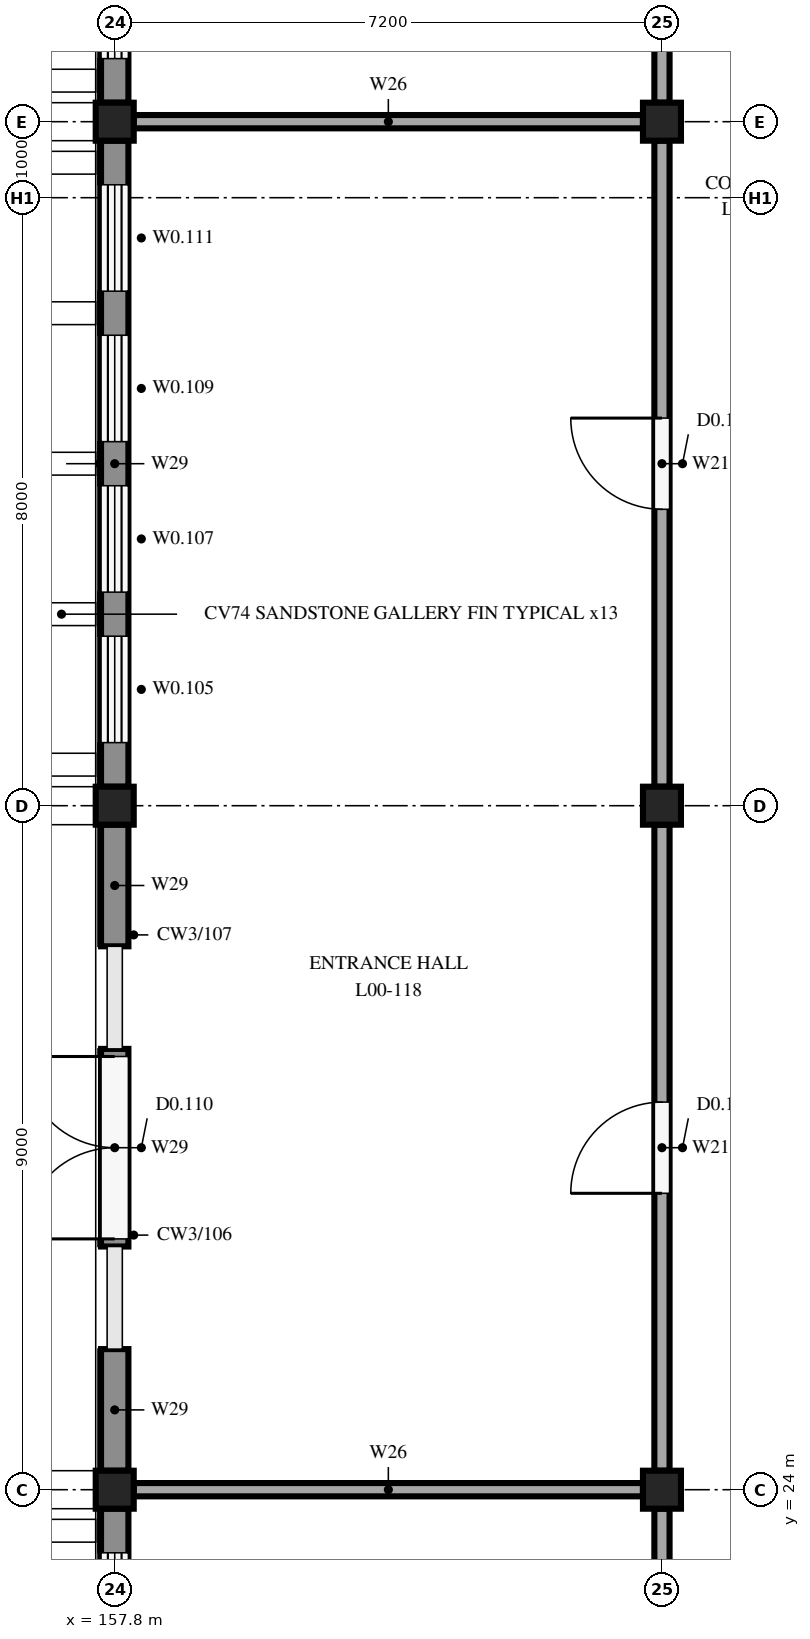
"""IFC4 building model, lengths in metres.
Left out: names, types, materials, properties, quantities, classifications, styles, units other than length and angle.
Written with IfcOpenShell. Run it as: python <this file> out.ifc"""

import sys

from ifc_helpers import new_model, si_unit, direction, frame, frame_2d, origin, origin_2d, place, context, subcontext, project, spatial, rectangle, extrude, element, fill, save


model = new_model("IFC4")
c1 = context("Model", 3, precision=1e-05, world=origin(), true_north=direction((0.0, 1.0)))
c2 = subcontext(c1, "Body", "Model", "MODEL_VIEW")
j1 = project(units=[si_unit("LENGTHUNIT", "METRE"), si_unit("PLANEANGLEUNIT", "RADIAN")], contexts=[c1])
p1 = place(None, origin())
s1 = spatial("IfcSite", under=j1, at=p1, CompositionType="ELEMENT")
p2 = place(p1, origin())
s2 = spatial("IfcBuilding", under=s1, at=p2, CompositionType="ELEMENT")
p3 = place(p2, origin())
s3 = spatial("IfcBuildingStorey", under=s2, at=p3, CompositionType="ELEMENT", Elevation=0.0)
for number, where, z_axis, x_axis in (
    (1, (157.8, 24.0, 0.0), (0.0, 0.0, 1.0), (1.0, 0.0, 0.0)),
    (2, (157.8, 33.0, 0.0), (0.0, 0.0, 1.0), (1.0, 0.0, 0.0)),
    (3, (157.8, 42.0, 0.0), (0.0, 0.0, 1.0), (1.0, 0.0, 0.0)),
    (4, (165.0, 24.0, 0.0), (0.0, 0.0, 1.0), (1.0, 0.0, 0.0)),
    (5, (165.0, 33.0, 0.0), (0.0, 0.0, 1.0), (1.0, 0.0, 0.0)),
    (6, (165.0, 42.0, 0.0), (0.0, 0.0, 1.0), (1.0, 0.0, 0.0)),
):
    element("IfcColumn", number, at=place(p3, frame(where, z_axis=z_axis, x_axis=x_axis)), inside=s3, PredefinedType="COLUMN", context=c2, shape_type="SweptSolid", body=[
        extrude(rectangle(XDim=0.5, YDim=0.5, at=origin_2d()), origin(), (0.0, 0.0, 1.0), 4.25),
    ])
p4 = place(p3, frame((157.8, 15.25, 0.0), z_axis=(0.0, 0.0, 1.0), x_axis=(0.0, 1.0, 0.0)))
e7 = element("IfcWall", 7, at=p4, inside=s3, PredefinedType="STANDARD", context=c2, shape_type="SweptSolid", body=[
    extrude(rectangle(XDim=8.5, YDim=0.36, at=frame_2d((4.25, 0.0))), origin(), (0.0, 0.0, 1.0), 3.75),
])
p5 = place(p4, frame((0.58, 0.0, 0.6)))
e8 = element("IfcOpeningElement", 8, at=p5, cuts=e7, PredefinedType="OPENING", context=c2, shape_type="SweptSolid", body=[
    extrude(rectangle(XDim=1.4, YDim=3.0, at=frame_2d((0.7, 1.5))), frame((0.0, 0.19, 0.0), z_axis=(0.0, -1.0, 0.0), x_axis=(1.0, 0.0, 0.0)), (0.0, 0.0, 1.0), 0.38),
])
p6 = place(p4, frame((2.56, 0.0, 0.6)))
e9 = element("IfcOpeningElement", 9, at=p6, cuts=e7, PredefinedType="OPENING", context=c2, shape_type="SweptSolid", body=[
    extrude(rectangle(XDim=1.4, YDim=3.0, at=frame_2d((0.7, 1.5))), frame((0.0, 0.19, 0.0), z_axis=(0.0, -1.0, 0.0), x_axis=(1.0, 0.0, 0.0)), (0.0, 0.0, 1.0), 0.38),
])
p7 = place(p4, frame((4.54, 0.0, 0.6)))
e10 = element("IfcOpeningElement", 10, at=p7, cuts=e7, PredefinedType="OPENING", context=c2, shape_type="SweptSolid", body=[
    extrude(rectangle(XDim=1.4, YDim=3.0, at=frame_2d((0.7, 1.5))), frame((0.0, 0.19, 0.0), z_axis=(0.0, -1.0, 0.0), x_axis=(1.0, 0.0, 0.0)), (0.0, 0.0, 1.0), 0.38),
])
p8 = place(p4, frame((6.52, 0.0, 0.6)))
e11 = element("IfcOpeningElement", 11, at=p8, cuts=e7, PredefinedType="OPENING", context=c2, shape_type="SweptSolid", body=[
    extrude(rectangle(XDim=1.4, YDim=3.0, at=frame_2d((0.7, 1.5))), frame((0.0, 0.19, 0.0), z_axis=(0.0, -1.0, 0.0), x_axis=(1.0, 0.0, 0.0)), (0.0, 0.0, 1.0), 0.38),
])
p9 = place(p3, frame((157.8, 24.25, 0.0), z_axis=(0.0, 0.0, 1.0), x_axis=(0.0, 1.0, 0.0)))
e12 = element("IfcWall", 12, at=p9, inside=s3, PredefinedType="STANDARD", context=c2, shape_type="SweptSolid", body=[
    extrude(rectangle(XDim=1.6, YDim=0.36, at=frame_2d((0.8, 0.0))), origin(), (0.0, 0.0, 1.0), 3.75),
])
p10 = place(p3, frame((157.8, 27.2, 0.0), z_axis=(0.0, 0.0, 1.0), x_axis=(0.0, 1.0, 0.0)))
e13 = element("IfcWall", 13, at=p10, inside=s3, PredefinedType="STANDARD", context=c2, shape_type="SweptSolid", body=[
    extrude(rectangle(XDim=2.6, YDim=0.36, at=frame_2d((1.3, 0.0))), origin(), (0.0, 0.0, 1.0), 3.75),
])
p11 = place(p10, frame((0.1, 0.0, 0.0)))
e14 = element("IfcOpeningElement", 14, at=p11, cuts=e13, PredefinedType="OPENING", context=c2, shape_type="SweptSolid", body=[
    extrude(rectangle(XDim=2.4, YDim=2.2, at=frame_2d((1.2, 1.1))), frame((0.0, 0.19, 0.0), z_axis=(0.0, -1.0, 0.0), x_axis=(1.0, 0.0, 0.0)), (0.0, 0.0, 1.0), 0.38),
])
p12 = place(p3, frame((157.8, 31.15, 0.0), z_axis=(0.0, 0.0, 1.0), x_axis=(0.0, 1.0, 0.0)))
e15 = element("IfcWall", 15, at=p12, inside=s3, PredefinedType="STANDARD", context=c2, shape_type="SweptSolid", body=[
    extrude(rectangle(XDim=1.6, YDim=0.36, at=frame_2d((0.8, 0.0))), origin(), (0.0, 0.0, 1.0), 3.75),
])
p13 = place(p3, frame((157.8, 33.25, 0.0), z_axis=(0.0, 0.0, 1.0), x_axis=(0.0, 1.0, 0.0)))
e16 = element("IfcWall", 16, at=p13, inside=s3, PredefinedType="STANDARD", context=c2, shape_type="SweptSolid", body=[
    extrude(rectangle(XDim=8.5, YDim=0.36, at=frame_2d((4.25, 0.0))), origin(), (0.0, 0.0, 1.0), 3.75),
])
p14 = place(p13, frame((0.58, 0.0, 0.6)))
e17 = element("IfcOpeningElement", 17, at=p14, cuts=e16, PredefinedType="OPENING", context=c2, shape_type="SweptSolid", body=[
    extrude(rectangle(XDim=1.4, YDim=3.0, at=frame_2d((0.7, 1.5))), frame((0.0, 0.19, 0.0), z_axis=(0.0, -1.0, 0.0), x_axis=(1.0, 0.0, 0.0)), (0.0, 0.0, 1.0), 0.38),
])
p15 = place(p13, frame((2.56, 0.0, 0.6)))
e18 = element("IfcOpeningElement", 18, at=p15, cuts=e16, PredefinedType="OPENING", context=c2, shape_type="SweptSolid", body=[
    extrude(rectangle(XDim=1.4, YDim=3.0, at=frame_2d((0.7, 1.5))), frame((0.0, 0.19, 0.0), z_axis=(0.0, -1.0, 0.0), x_axis=(1.0, 0.0, 0.0)), (0.0, 0.0, 1.0), 0.38),
])
p16 = place(p13, frame((4.54, 0.0, 0.6)))
e19 = element("IfcOpeningElement", 19, at=p16, cuts=e16, PredefinedType="OPENING", context=c2, shape_type="SweptSolid", body=[
    extrude(rectangle(XDim=1.4, YDim=3.0, at=frame_2d((0.7, 1.5))), frame((0.0, 0.19, 0.0), z_axis=(0.0, -1.0, 0.0), x_axis=(1.0, 0.0, 0.0)), (0.0, 0.0, 1.0), 0.38),
])
p17 = place(p13, frame((6.52, 0.0, 0.6)))
e20 = element("IfcOpeningElement", 20, at=p17, cuts=e16, PredefinedType="OPENING", context=c2, shape_type="SweptSolid", body=[
    extrude(rectangle(XDim=1.4, YDim=3.0, at=frame_2d((0.7, 1.5))), frame((0.0, 0.19, 0.0), z_axis=(0.0, -1.0, 0.0), x_axis=(1.0, 0.0, 0.0)), (0.0, 0.0, 1.0), 0.38),
])
p18 = place(p3, frame((157.8, 42.25, 0.0), z_axis=(0.0, 0.0, 1.0), x_axis=(0.0, 1.0, 0.0)))
e21 = element("IfcWall", 21, at=p18, inside=s3, PredefinedType="STANDARD", context=c2, shape_type="SweptSolid", body=[
    extrude(rectangle(XDim=8.5, YDim=0.36, at=frame_2d((4.25, 0.0))), origin(), (0.0, 0.0, 1.0), 3.75),
])
p19 = place(p18, frame((0.58, 0.0, 0.6)))
e22 = element("IfcOpeningElement", 22, at=p19, cuts=e21, PredefinedType="OPENING", context=c2, shape_type="SweptSolid", body=[
    extrude(rectangle(XDim=1.4, YDim=3.0, at=frame_2d((0.7, 1.5))), frame((0.0, 0.19, 0.0), z_axis=(0.0, -1.0, 0.0), x_axis=(1.0, 0.0, 0.0)), (0.0, 0.0, 1.0), 0.38),
])
p20 = place(p18, frame((2.56, 0.0, 0.6)))
e23 = element("IfcOpeningElement", 23, at=p20, cuts=e21, PredefinedType="OPENING", context=c2, shape_type="SweptSolid", body=[
    extrude(rectangle(XDim=1.4, YDim=3.0, at=frame_2d((0.7, 1.5))), frame((0.0, 0.19, 0.0), z_axis=(0.0, -1.0, 0.0), x_axis=(1.0, 0.0, 0.0)), (0.0, 0.0, 1.0), 0.38),
])
p21 = place(p18, frame((4.54, 0.0, 0.6)))
e24 = element("IfcOpeningElement", 24, at=p21, cuts=e21, PredefinedType="OPENING", context=c2, shape_type="SweptSolid", body=[
    extrude(rectangle(XDim=1.4, YDim=3.0, at=frame_2d((0.7, 1.5))), frame((0.0, 0.19, 0.0), z_axis=(0.0, -1.0, 0.0), x_axis=(1.0, 0.0, 0.0)), (0.0, 0.0, 1.0), 0.38),
])
p22 = place(p18, frame((6.52, 0.0, 0.6)))
e25 = element("IfcOpeningElement", 25, at=p22, cuts=e21, PredefinedType="OPENING", context=c2, shape_type="SweptSolid", body=[
    extrude(rectangle(XDim=1.4, YDim=3.0, at=frame_2d((0.7, 1.5))), frame((0.0, 0.19, 0.0), z_axis=(0.0, -1.0, 0.0), x_axis=(1.0, 0.0, 0.0)), (0.0, 0.0, 1.0), 0.38),
])
p23 = place(p3, frame((165.0, 15.25, 0.0), z_axis=(0.0, 0.0, 1.0), x_axis=(0.0, 1.0, 0.0)))
e26 = element("IfcWall", 26, at=p23, inside=s3, PredefinedType="PARTITIONING", context=c2, shape_type="SweptSolid", body=[
    extrude(rectangle(XDim=8.5, YDim=0.2, at=frame_2d((4.25, 0.0))), origin(), (0.0, 0.0, 1.0), 3.8),
])
p24 = place(p23, frame((3.75, 0.0, 0.0)))
e27 = element("IfcOpeningElement", 27, at=p24, cuts=e26, PredefinedType="OPENING", context=c2, shape_type="SweptSolid", body=[
    extrude(rectangle(XDim=1.0, YDim=2.1, at=frame_2d((0.5, 1.05))), frame((0.0, 0.11, 0.0), z_axis=(0.0, -1.0, 0.0), x_axis=(1.0, 0.0, 0.0)), (0.0, 0.0, 1.0), 0.22),
])
p25 = place(p3, frame((165.0, 24.25, 0.0), z_axis=(0.0, 0.0, 1.0), x_axis=(0.0, 1.0, 0.0)))
e28 = element("IfcWall", 28, at=p25, inside=s3, PredefinedType="PARTITIONING", context=c2, shape_type="SweptSolid", body=[
    extrude(rectangle(XDim=8.5, YDim=0.2, at=frame_2d((4.25, 0.0))), origin(), (0.0, 0.0, 1.0), 3.8),
])
p26 = place(p25, frame((3.65, 0.0, 0.0)))
e29 = element("IfcOpeningElement", 29, at=p26, cuts=e28, PredefinedType="OPENING", context=c2, shape_type="SweptSolid", body=[
    extrude(rectangle(XDim=1.2, YDim=2.1, at=frame_2d((0.6, 1.05))), frame((0.0, 0.11, 0.0), z_axis=(0.0, -1.0, 0.0), x_axis=(1.0, 0.0, 0.0)), (0.0, 0.0, 1.0), 0.22),
])
p27 = place(p3, frame((165.0, 33.25, 0.0), z_axis=(0.0, 0.0, 1.0), x_axis=(0.0, 1.0, 0.0)))
e30 = element("IfcWall", 30, at=p27, inside=s3, PredefinedType="PARTITIONING", context=c2, shape_type="SweptSolid", body=[
    extrude(rectangle(XDim=8.5, YDim=0.2, at=frame_2d((4.25, 0.0))), origin(), (0.0, 0.0, 1.0), 3.8),
])
p28 = place(p27, frame((3.65, 0.0, 0.0)))
e31 = element("IfcOpeningElement", 31, at=p28, cuts=e30, PredefinedType="OPENING", context=c2, shape_type="SweptSolid", body=[
    extrude(rectangle(XDim=1.2, YDim=2.1, at=frame_2d((0.6, 1.05))), frame((0.0, 0.11, 0.0), z_axis=(0.0, -1.0, 0.0), x_axis=(1.0, 0.0, 0.0)), (0.0, 0.0, 1.0), 0.22),
])
p29 = place(p3, frame((165.0, 42.25, 0.0), z_axis=(0.0, 0.0, 1.0), x_axis=(0.0, 1.0, 0.0)))
e32 = element("IfcWall", 32, at=p29, inside=s3, PredefinedType="PARTITIONING", context=c2, shape_type="SweptSolid", body=[
    extrude(rectangle(XDim=8.5, YDim=0.2, at=frame_2d((4.25, 0.0))), origin(), (0.0, 0.0, 1.0), 3.8),
])
p30 = place(p29, frame((3.75, 0.0, 0.0)))
e33 = element("IfcOpeningElement", 33, at=p30, cuts=e32, PredefinedType="OPENING", context=c2, shape_type="SweptSolid", body=[
    extrude(rectangle(XDim=1.0, YDim=2.1, at=frame_2d((0.5, 1.05))), frame((0.0, 0.11, 0.0), z_axis=(0.0, -1.0, 0.0), x_axis=(1.0, 0.0, 0.0)), (0.0, 0.0, 1.0), 0.22),
])
for number, where, z_axis, x_axis in (
    (34, (158.05, 24.0, 0.0), (0.0, 0.0, 1.0), (1.0, 0.0, 0.0)),
    (35, (158.05, 42.0, 0.0), (0.0, 0.0, 1.0), (1.0, 0.0, 0.0)),
):
    element("IfcWall", number, at=place(p3, frame(where, z_axis=z_axis, x_axis=x_axis)), inside=s3, PredefinedType="PARTITIONING", context=c2, shape_type="SweptSolid", body=[
        extrude(rectangle(XDim=6.7, YDim=0.175, at=frame_2d((3.35, 0.0))), origin(), (0.0, 0.0, 1.0), 3.8),
    ])
p31 = place(p8, origin())
e36 = element("IfcWindow", 36, at=p31, inside=s3, PartitioningType="DOUBLE_PANEL_VERTICAL", PredefinedType="WINDOW", context=c2, shape_type="SweptSolid", body=[
    extrude(rectangle(XDim=1.4, YDim=3.0, at=frame_2d((0.7, 1.5))), frame((0.0, 0.03, 0.0), z_axis=(0.0, -1.0, 0.0), x_axis=(1.0, 0.0, 0.0)), (0.0, 0.0, 1.0), 0.06),
])
fill(e11, e36)
p32 = place(p11, origin())
e37 = element("IfcDoor", 37, at=p32, inside=s3, OperationType="DOUBLE_DOOR_SINGLE_SWING", PredefinedType="DOOR", context=c2, shape_type="SweptSolid", body=[
    extrude(rectangle(XDim=2.4, YDim=2.2, at=frame_2d((1.2, 1.1))), frame((0.0, 0.025, 0.0), z_axis=(0.0, -1.0, 0.0), x_axis=(1.0, 0.0, 0.0)), (0.0, 0.0, 1.0), 0.05),
])
fill(e14, e37)
p33 = place(p14, origin())
e38 = element("IfcWindow", 38, at=p33, inside=s3, PartitioningType="DOUBLE_PANEL_VERTICAL", PredefinedType="WINDOW", context=c2, shape_type="SweptSolid", body=[
    extrude(rectangle(XDim=1.4, YDim=3.0, at=frame_2d((0.7, 1.5))), frame((0.0, 0.03, 0.0), z_axis=(0.0, -1.0, 0.0), x_axis=(1.0, 0.0, 0.0)), (0.0, 0.0, 1.0), 0.06),
])
fill(e17, e38)
p34 = place(p15, origin())
e39 = element("IfcWindow", 39, at=p34, inside=s3, PartitioningType="DOUBLE_PANEL_VERTICAL", PredefinedType="WINDOW", context=c2, shape_type="SweptSolid", body=[
    extrude(rectangle(XDim=1.4, YDim=3.0, at=frame_2d((0.7, 1.5))), frame((0.0, 0.03, 0.0), z_axis=(0.0, -1.0, 0.0), x_axis=(1.0, 0.0, 0.0)), (0.0, 0.0, 1.0), 0.06),
])
fill(e18, e39)
p35 = place(p16, origin())
e40 = element("IfcWindow", 40, at=p35, inside=s3, PartitioningType="DOUBLE_PANEL_VERTICAL", PredefinedType="WINDOW", context=c2, shape_type="SweptSolid", body=[
    extrude(rectangle(XDim=1.4, YDim=3.0, at=frame_2d((0.7, 1.5))), frame((0.0, 0.03, 0.0), z_axis=(0.0, -1.0, 0.0), x_axis=(1.0, 0.0, 0.0)), (0.0, 0.0, 1.0), 0.06),
])
fill(e19, e40)
p36 = place(p17, origin())
e41 = element("IfcWindow", 41, at=p36, inside=s3, PartitioningType="DOUBLE_PANEL_VERTICAL", PredefinedType="WINDOW", context=c2, shape_type="SweptSolid", body=[
    extrude(rectangle(XDim=1.4, YDim=3.0, at=frame_2d((0.7, 1.5))), frame((0.0, 0.03, 0.0), z_axis=(0.0, -1.0, 0.0), x_axis=(1.0, 0.0, 0.0)), (0.0, 0.0, 1.0), 0.06),
])
fill(e20, e41)
p37 = place(p19, origin())
e42 = element("IfcWindow", 42, at=p37, inside=s3, PartitioningType="DOUBLE_PANEL_VERTICAL", PredefinedType="WINDOW", context=c2, shape_type="SweptSolid", body=[
    extrude(rectangle(XDim=1.4, YDim=3.0, at=frame_2d((0.7, 1.5))), frame((0.0, 0.03, 0.0), z_axis=(0.0, -1.0, 0.0), x_axis=(1.0, 0.0, 0.0)), (0.0, 0.0, 1.0), 0.06),
])
fill(e22, e42)
p38 = place(p26, origin())
e43 = element("IfcDoor", 43, at=p38, inside=s3, OperationType="SINGLE_SWING_LEFT", PredefinedType="DOOR", context=c2, shape_type="SweptSolid", body=[
    extrude(rectangle(XDim=1.2, YDim=2.1, at=frame_2d((0.6, 1.05))), frame((0.0, 0.025, 0.0), z_axis=(0.0, -1.0, 0.0), x_axis=(1.0, 0.0, 0.0)), (0.0, 0.0, 1.0), 0.05),
])
fill(e29, e43)
p39 = place(p28, origin())
e44 = element("IfcDoor", 44, at=p39, inside=s3, OperationType="SINGLE_SWING_RIGHT", PredefinedType="DOOR", context=c2, shape_type="SweptSolid", body=[
    extrude(rectangle(XDim=1.2, YDim=2.1, at=frame_2d((0.6, 1.05))), frame((0.0, 0.025, 0.0), z_axis=(0.0, -1.0, 0.0), x_axis=(1.0, 0.0, 0.0)), (0.0, 0.0, 1.0), 0.05),
])
fill(e31, e44)
save(model, sys.argv[1])
